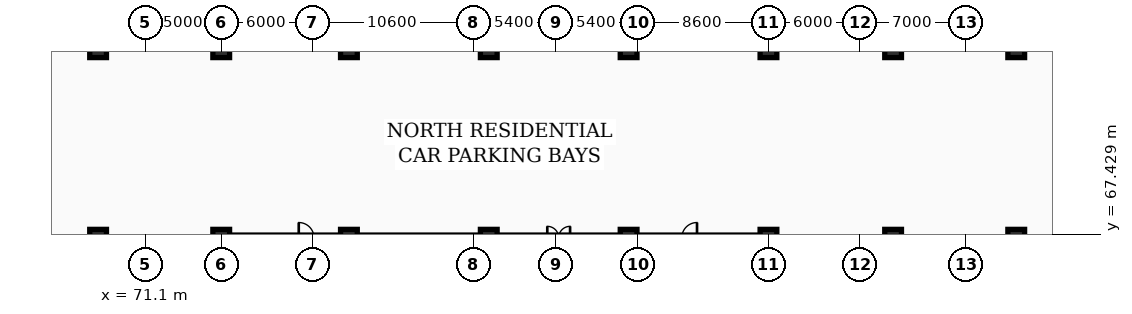
"""IFC4 building model, lengths in metres.
Left out: names, types, materials, properties, quantities, classifications, styles, units other than length and angle.
Written with IfcOpenShell. Run it as: python <this file> out.ifc"""

import sys

from ifc_helpers import new_model, si_unit, direction, frame, origin, origin_2d, place, context, subcontext, project, spatial, rectangle, extrude, element, save


model = new_model("IFC4")
c1 = context("Model", 3, precision=1e-05, world=origin(), true_north=direction((0.0, 1.0)))
c2 = subcontext(c1, "Body", "Model", "MODEL_VIEW")
j1 = project(units=[si_unit("LENGTHUNIT", "METRE"), si_unit("PLANEANGLEUNIT", "RADIAN")], contexts=[c1])
p1 = place(None, origin())
s1 = spatial("IfcSite", under=j1, at=p1, CompositionType="ELEMENT")
p2 = place(p1, origin())
s2 = spatial("IfcBuilding", under=s1, at=p2, CompositionType="ELEMENT")
p3 = place(p2, frame((0.0, 0.0, -7.2)))
s3 = spatial("IfcBuildingStorey", under=s2, at=p3, CompositionType="ELEMENT", Elevation=-7.2)
for number, where, z_axis, x_axis in (
    (1, (68.0, 67.2, 0.0), (0.0, 0.0, 1.0), (1.0, 0.0, 0.0)),
    (2, (68.0, 79.6, 0.0), (0.0, 0.0, 1.0), (1.0, 0.0, 0.0)),
    (3, (76.1, 67.2, 0.0), (0.0, 0.0, 1.0), (1.0, 0.0, 0.0)),
    (4, (76.1, 79.6, 0.0), (0.0, 0.0, 1.0), (1.0, 0.0, 0.0)),
    (5, (84.5, 67.2, 0.0), (0.0, 0.0, 1.0), (1.0, 0.0, 0.0)),
    (6, (84.5, 79.6, 0.0), (0.0, 0.0, 1.0), (1.0, 0.0, 0.0)),
    (7, (93.7, 67.2, 0.0), (0.0, 0.0, 1.0), (1.0, 0.0, 0.0)),
    (8, (93.7, 79.6, 0.0), (0.0, 0.0, 1.0), (1.0, 0.0, 0.0)),
    (9, (102.9, 67.2, 0.0), (0.0, 0.0, 1.0), (1.0, 0.0, 0.0)),
    (10, (102.9, 79.6, 0.0), (0.0, 0.0, 1.0), (1.0, 0.0, 0.0)),
    (11, (112.1, 67.2, 0.0), (0.0, 0.0, 1.0), (1.0, 0.0, 0.0)),
    (12, (112.1, 79.6, 0.0), (0.0, 0.0, 1.0), (1.0, 0.0, 0.0)),
    (13, (120.3, 67.2, 0.0), (0.0, 0.0, 1.0), (1.0, 0.0, 0.0)),
    (14, (120.3, 79.6, 0.0), (0.0, 0.0, 1.0), (1.0, 0.0, 0.0)),
    (15, (128.4, 67.2, 0.0), (0.0, 0.0, 1.0), (1.0, 0.0, 0.0)),
    (16, (128.4, 79.6, 0.0), (0.0, 0.0, 1.0), (1.0, 0.0, 0.0)),
):
    element("IfcColumn", number, at=place(p3, frame(where, z_axis=z_axis, x_axis=x_axis)), inside=s3, PredefinedType="COLUMN", context=c2, shape_type="SweptSolid", body=[
        extrude(rectangle(XDim=1.1, YDim=1.1, at=origin_2d()), origin(), (0.0, 0.0, 1.0), 3.6),
    ])
save(model, sys.argv[1])
